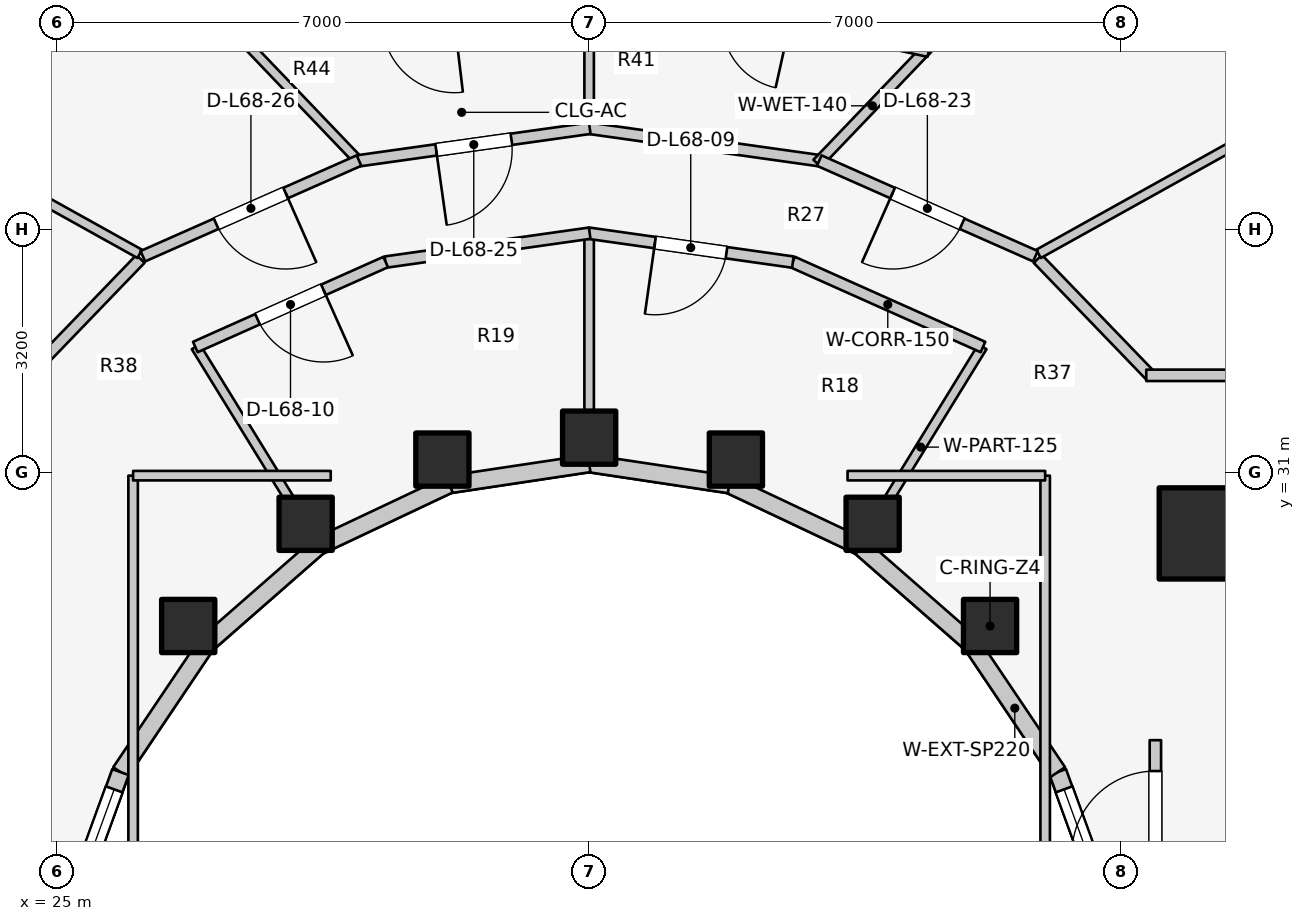
"""IFC4 building model, lengths in metres.
Left out: names, types, materials, properties, quantities, classifications, styles, units other than length and angle.
Written with IfcOpenShell. Run it as: python <this file> out.ifc"""

import sys

from ifc_helpers import new_model, si_unit, direction, frame, frame_2d, origin, origin_2d, place, context, subcontext, project, spatial, rectangle, extrude, element, fill, save


model = new_model("IFC4")
c1 = context("Model", 3, precision=1e-05, world=origin(), true_north=direction((0.0, 1.0)))
c2 = subcontext(c1, "Body", "Model", "MODEL_VIEW")
j1 = project(units=[si_unit("LENGTHUNIT", "METRE"), si_unit("PLANEANGLEUNIT", "RADIAN")], contexts=[c1])
p1 = place(None, origin())
s1 = spatial("IfcSite", under=j1, at=p1, CompositionType="ELEMENT")
p2 = place(p1, origin())
s2 = spatial("IfcBuilding", under=s1, at=p2, CompositionType="ELEMENT")
p3 = place(p2, frame((0.0, 0.0, 223.3)))
s3 = spatial("IfcBuildingStorey", under=s2, at=p3, CompositionType="ELEMENT", Elevation=223.3)
p4 = place(p3, frame((39.85, 30.35, 0.0), z_axis=(0.0, 0.0, 1.0), x_axis=(1.0, 0.0, 0.0)))
e1 = element("IfcWall", 1, at=p4, inside=s3, PredefinedType="SHEAR", context=c2, shape_type="SweptSolid", body=[
    extrude(rectangle(XDim=4.5, YDim=0.55, at=frame_2d((2.25, 0.0))), origin(), (0.0, 0.0, 1.0), 3.1),
])
p5 = place(p3, frame((40.1, 30.2, 0.0), z_axis=(0.0, 0.0, 1.0), x_axis=(1.0, 0.0, 0.0)))
e2 = element("IfcColumn", 2, at=p5, inside=s3, PredefinedType="COLUMN", context=c2, shape_type="SweptSolid", body=[
    extrude(rectangle(XDim=1.2, YDim=1.2, at=origin_2d()), origin(), (0.0, 0.0, 1.0), 3.1),
])
for number, where, z_axis, x_axis in (
    (3, (37.275, 28.982, 0.0), (0.0, 0.0, 1.0), (1.0, 0.0, 0.0)),
    (4, (35.73, 30.327, 0.0), (0.0, 0.0, 1.0), (1.0, 0.0, 0.0)),
    (5, (33.931, 31.172, 0.0), (0.0, 0.0, 1.0), (1.0, 0.0, 0.0)),
    (6, (32.0, 31.46, 0.0), (0.0, 0.0, 1.0), (1.0, 0.0, 0.0)),
    (7, (30.069, 31.172, 0.0), (0.0, 0.0, 1.0), (1.0, 0.0, 0.0)),
    (8, (28.27, 30.327, 0.0), (0.0, 0.0, 1.0), (1.0, 0.0, 0.0)),
    (9, (26.725, 28.982, 0.0), (0.0, 0.0, 1.0), (1.0, 0.0, 0.0)),
):
    element("IfcColumn", number, at=place(p3, frame(where, z_axis=z_axis, x_axis=x_axis)), inside=s3, PredefinedType="COLUMN", context=c2, shape_type="SweptSolid", body=[
        extrude(rectangle(XDim=0.7, YDim=0.7, at=origin_2d()), origin(), (0.0, 0.0, 1.0), 3.1),
    ])
p6 = place(p3, frame((38.877, 25.102, 0.0), z_axis=(0.0, 0.0, 1.0), x_axis=(-0.341423187295, 0.93990968033, 0.0)))
e10 = element("IfcWall", 10, at=p6, inside=s3, PredefinedType="STANDARD", context=c2, shape_type="SweptSolid", body=[
    extrude(rectangle(XDim=2.084, YDim=0.23, at=frame_2d((1.042, 0.0))), origin(), (0.0, 0.0, 1.0), 2.84),
])
p7 = place(p6, frame((0.242, 0.0, 0.85)))
e11 = element("IfcOpeningElement", 11, at=p7, cuts=e10, PredefinedType="OPENING", context=c2, shape_type="SweptSolid", body=[
    extrude(rectangle(XDim=1.6, YDim=1.65, at=frame_2d((0.8, 0.825))), frame((0.0, 0.125, 0.0), z_axis=(0.0, -1.0, 0.0), x_axis=(1.0, 0.0, 0.0)), (0.0, 0.0, 1.0), 0.25),
])
p8 = place(p3, frame((38.166, 27.06, 0.0), z_axis=(0.0, 0.0, 1.0), x_axis=(-0.558197800898, 0.829707909492, 0.0)))
e12 = element("IfcWall", 12, at=p8, inside=s3, PredefinedType="STANDARD", context=c2, shape_type="SweptSolid", body=[
    extrude(rectangle(XDim=2.027, YDim=0.23, at=frame_2d((1.013, 0.0))), origin(), (0.0, 0.0, 1.0), 2.16),
])
p9 = place(p3, frame((37.035, 28.742, 0.0), z_axis=(0.0, 0.0, 1.0), x_axis=(-0.752576694707, 0.658504607869, 0.0)))
e13 = element("IfcWall", 13, at=p9, inside=s3, PredefinedType="STANDARD", context=c2, shape_type="SweptSolid", body=[
    extrude(rectangle(XDim=1.959, YDim=0.23, at=frame_2d((0.98, 0.0))), origin(), (0.0, 0.0, 1.0), 2.16),
])
p10 = place(p3, frame((35.56, 30.032, 0.0), z_axis=(0.0, 0.0, 1.0), x_axis=(-0.904179699603, 0.427152280606, 0.0)))
e14 = element("IfcWall", 14, at=p10, inside=s3, PredefinedType="STANDARD", context=c2, shape_type="SweptSolid", body=[
    extrude(rectangle(XDim=1.899, YDim=0.23, at=frame_2d((0.95, 0.0))), origin(), (0.0, 0.0, 1.0), 2.16),
])
for number, where, z_axis, x_axis in (
    (15, (33.843, 30.843, 0.0), (0.0, 0.0, 1.0), (-0.989, 0.149, 0.0)),
    (16, (32.0, 31.12, 0.0), (0.0, 0.0, 1.0), (-0.989, -0.149, 0.0)),
):
    element("IfcWall", number, at=place(p3, frame(where, z_axis=z_axis, x_axis=x_axis)), inside=s3, PredefinedType="STANDARD", context=c2, shape_type="SweptSolid", body=[
        extrude(rectangle(XDim=1.864, YDim=0.23, at=frame_2d((0.932, 0.0))), origin(), (0.0, 0.0, 1.0), 2.16),
    ])
p11 = place(p3, frame((30.157, 30.843, 0.0), z_axis=(0.0, 0.0, 1.0), x_axis=(-0.904179699603, -0.427152280606, 0.0)))
e17 = element("IfcWall", 17, at=p11, inside=s3, PredefinedType="STANDARD", context=c2, shape_type="SweptSolid", body=[
    extrude(rectangle(XDim=1.899, YDim=0.23, at=frame_2d((0.95, 0.0))), origin(), (0.0, 0.0, 1.0), 2.16),
])
p12 = place(p3, frame((28.44, 30.032, 0.0), z_axis=(0.0, 0.0, 1.0), x_axis=(-0.752576694707, -0.658504607869, 0.0)))
e18 = element("IfcWall", 18, at=p12, inside=s3, PredefinedType="STANDARD", context=c2, shape_type="SweptSolid", body=[
    extrude(rectangle(XDim=1.959, YDim=0.23, at=frame_2d((0.98, 0.0))), origin(), (0.0, 0.0, 1.0), 2.16),
])
p13 = place(p3, frame((26.965, 28.742, 0.0), z_axis=(0.0, 0.0, 1.0), x_axis=(-0.558197800898, -0.829707909492, 0.0)))
e19 = element("IfcWall", 19, at=p13, inside=s3, PredefinedType="STANDARD", context=c2, shape_type="SweptSolid", body=[
    extrude(rectangle(XDim=2.027, YDim=0.23, at=frame_2d((1.013, 0.0))), origin(), (0.0, 0.0, 1.0), 2.16),
])
p14 = place(p3, frame((25.834, 27.06, 0.0), z_axis=(0.0, 0.0, 1.0), x_axis=(-0.341423187295, -0.93990968033, 0.0)))
e20 = element("IfcWall", 20, at=p14, inside=s3, PredefinedType="STANDARD", context=c2, shape_type="SweptSolid", body=[
    extrude(rectangle(XDim=2.084, YDim=0.23, at=frame_2d((1.042, 0.0))), origin(), (0.0, 0.0, 1.0), 2.84),
])
p15 = place(p14, frame((0.242, 0.0, 0.85)))
e21 = element("IfcOpeningElement", 21, at=p15, cuts=e20, PredefinedType="OPENING", context=c2, shape_type="SweptSolid", body=[
    extrude(rectangle(XDim=1.6, YDim=1.65, at=frame_2d((0.8, 0.825))), frame((0.0, 0.125, 0.0), z_axis=(0.0, -1.0, 0.0), x_axis=(1.0, 0.0, 0.0)), (0.0, 0.0, 1.0), 0.25),
])
p16 = place(p3, frame((39.45, 24.08, 0.0), z_axis=(0.0, 0.0, 1.0), x_axis=(0.0, 1.0, 0.0)))
e22 = element("IfcWall", 22, at=p16, inside=s3, PredefinedType="PARTITIONING", context=c2, shape_type="SweptSolid", body=[
    extrude(rectangle(XDim=3.4, YDim=0.15, at=frame_2d((1.7, 0.0))), origin(), (0.0, 0.0, 1.0), 2.855),
])
p17 = place(p16, frame((1.894, 0.0, 0.0)))
e23 = element("IfcOpeningElement", 23, at=p17, cuts=e22, PredefinedType="OPENING", context=c2, shape_type="SweptSolid", body=[
    extrude(rectangle(XDim=1.1, YDim=2.1, at=frame_2d((0.55, 1.05))), frame((0.0, 0.085, 0.0), z_axis=(0.0, -1.0, 0.0), x_axis=(1.0, 0.0, 0.0)), (0.0, 0.0, 1.0), 0.17),
])
p18 = place(p3, frame((35.55, 30.015, 0.0), z_axis=(0.0, 0.0, 1.0), x_axis=(0.523992004803, 0.851723182086, 0.0)))
e24 = element("IfcWall", 24, at=p18, inside=s3, PredefinedType="PARTITIONING", context=c2, shape_type="SweptSolid", body=[
    extrude(rectangle(XDim=3.101, YDim=0.125, at=frame_2d((1.551, 0.0))), origin(), (0.0, 0.0, 1.0), 2.376),
])
p19 = place(p3, frame((32.0, 31.1, 0.0), z_axis=(0.0, 0.0, 1.0), x_axis=(0.0, 1.0, 0.0)))
e25 = element("IfcWall", 25, at=p19, inside=s3, PredefinedType="PARTITIONING", context=c2, shape_type="SweptSolid", body=[
    extrude(rectangle(XDim=3.05, YDim=0.125, at=frame_2d((1.525, 0.0))), origin(), (0.0, 0.0, 1.0), 2.376),
])
p20 = place(p3, frame((28.45, 30.015, 0.0), z_axis=(0.0, 0.0, 1.0), x_axis=(-0.523992004803, 0.851723182086, 0.0)))
e26 = element("IfcWall", 26, at=p20, inside=s3, PredefinedType="PARTITIONING", context=c2, shape_type="SweptSolid", body=[
    extrude(rectangle(XDim=3.101, YDim=0.125, at=frame_2d((1.551, 0.0))), origin(), (0.0, 0.0, 1.0), 2.376),
])
p21 = place(p3, frame((37.181, 32.652, 0.0), z_axis=(0.0, 0.0, 1.0), x_axis=(-0.913120130558, 0.407690602257, 0.0)))
e27 = element("IfcWall", 27, at=p21, inside=s3, PredefinedType="PARTITIONING", context=c2, shape_type="SweptSolid", body=[
    extrude(rectangle(XDim=2.743, YDim=0.15, at=frame_2d((1.371, 0.0))), origin(), (0.0, 0.0, 1.0), 2.376),
])
p22 = place(p3, frame((34.68, 33.77, 0.0), z_axis=(0.0, 0.0, 1.0), x_axis=(-0.990132151456, 0.140136799779, 0.0)))
e28 = element("IfcWall", 28, at=p22, inside=s3, PredefinedType="PARTITIONING", context=c2, shape_type="SweptSolid", body=[
    extrude(rectangle(XDim=2.714, YDim=0.15, at=frame_2d((1.357, 0.0))), origin(), (0.0, 0.0, 1.0), 2.376),
])
p23 = place(p22, frame((0.882, 0.0, 0.0)))
e29 = element("IfcOpeningElement", 29, at=p23, cuts=e28, PredefinedType="OPENING", context=c2, shape_type="SweptSolid", body=[
    extrude(rectangle(XDim=0.95, YDim=2.1, at=frame_2d((0.475, 1.05))), frame((0.0, 0.085, 0.0), z_axis=(0.0, -1.0, 0.0), x_axis=(1.0, 0.0, 0.0)), (0.0, 0.0, 1.0), 0.17),
])
p24 = place(p3, frame((32.007, 34.15, 0.0), z_axis=(0.0, 0.0, 1.0), x_axis=(-0.990132151456, -0.140136799779, 0.0)))
e30 = element("IfcWall", 30, at=p24, inside=s3, PredefinedType="PARTITIONING", context=c2, shape_type="SweptSolid", body=[
    extrude(rectangle(XDim=2.714, YDim=0.15, at=frame_2d((1.357, 0.0))), origin(), (0.0, 0.0, 1.0), 2.376),
])
p25 = place(p3, frame((29.323, 33.771, 0.0), z_axis=(0.0, 0.0, 1.0), x_axis=(-0.913120130558, -0.407690602257, 0.0)))
e31 = element("IfcWall", 31, at=p25, inside=s3, PredefinedType="PARTITIONING", context=c2, shape_type="SweptSolid", body=[
    extrude(rectangle(XDim=2.743, YDim=0.15, at=frame_2d((1.371, 0.0))), origin(), (0.0, 0.0, 1.0), 2.376),
])
p26 = place(p25, frame((0.896, 0.0, 0.0)))
e32 = element("IfcOpeningElement", 32, at=p26, cuts=e31, PredefinedType="OPENING", context=c2, shape_type="SweptSolid", body=[
    extrude(rectangle(XDim=0.95, YDim=2.1, at=frame_2d((0.475, 1.05))), frame((0.0, 0.085, 0.0), z_axis=(0.0, -1.0, 0.0), x_axis=(1.0, 0.0, 0.0)), (0.0, 0.0, 1.0), 0.17),
])
p27 = place(p3, frame((26.0, 25.8, 0.0), z_axis=(0.0, 0.0, 1.0), x_axis=(0.0, 1.0, 0.0)))
e33 = element("IfcWall", 33, at=p27, inside=s3, PredefinedType="PARTITIONING", context=c2, shape_type="SweptSolid", body=[
    extrude(rectangle(XDim=5.16, YDim=0.125, at=frame_2d((2.58, 0.0))), origin(), (0.0, 0.0, 1.0), 2.232),
])
p28 = place(p3, frame((26.0, 30.96, 0.0), z_axis=(0.0, 0.0, 1.0), x_axis=(1.0, 0.0, 0.0)))
e34 = element("IfcWall", 34, at=p28, inside=s3, PredefinedType="PARTITIONING", context=c2, shape_type="SweptSolid", body=[
    extrude(rectangle(XDim=2.6, YDim=0.125, at=frame_2d((1.3, 0.0))), origin(), (0.0, 0.0, 1.0), 2.376),
])
p29 = place(p3, frame((38.0, 25.8, 0.0), z_axis=(0.0, 0.0, 1.0), x_axis=(0.0, 1.0, 0.0)))
e35 = element("IfcWall", 35, at=p29, inside=s3, PredefinedType="PARTITIONING", context=c2, shape_type="SweptSolid", body=[
    extrude(rectangle(XDim=5.16, YDim=0.125, at=frame_2d((2.58, 0.0))), origin(), (0.0, 0.0, 1.0), 2.232),
])
p30 = place(p3, frame((35.4, 30.96, 0.0), z_axis=(0.0, 0.0, 1.0), x_axis=(1.0, 0.0, 0.0)))
e36 = element("IfcWall", 36, at=p30, inside=s3, PredefinedType="PARTITIONING", context=c2, shape_type="SweptSolid", body=[
    extrude(rectangle(XDim=2.6, YDim=0.125, at=frame_2d((1.3, 0.0))), origin(), (0.0, 0.0, 1.0), 2.376),
])
p31 = place(p3, frame((37.903, 33.812, 0.0), z_axis=(0.0, 0.0, 1.0), x_axis=(0.694032962553, -0.719943224768, 0.0)))
e37 = element("IfcWall", 37, at=p31, inside=s3, PredefinedType="PARTITIONING", context=c2, shape_type="SweptSolid", body=[
    extrude(rectangle(XDim=2.158, YDim=0.15, at=frame_2d((1.079, 0.0))), origin(), (0.0, 0.0, 1.0), 2.376),
])
p32 = place(p3, frame((39.33, 32.28, 0.0), z_axis=(0.0, 0.0, 1.0), x_axis=(1.0, 0.0, 0.0)))
e38 = element("IfcWall", 38, at=p32, inside=s3, PredefinedType="PARTITIONING", context=c2, shape_type="SweptSolid", body=[
    extrude(rectangle(XDim=7.52, YDim=0.15, at=frame_2d((3.76, 0.0))), origin(), (0.0, 0.0, 1.0), 2.376),
])
p33 = place(p32, frame((5.22, 0.0, 0.0)))
e39 = element("IfcOpeningElement", 39, at=p33, cuts=e38, PredefinedType="OPENING", context=c2, shape_type="SweptSolid", body=[
    extrude(rectangle(XDim=0.9, YDim=2.1, at=frame_2d((0.45, 1.05))), frame((0.0, 0.085, 0.0), z_axis=(0.0, -1.0, 0.0), x_axis=(1.0, 0.0, 0.0)), (0.0, 0.0, 1.0), 0.17),
])
p34 = place(p3, frame((26.097, 33.812, 0.0), z_axis=(0.0, 0.0, 1.0), x_axis=(-0.694032962553, -0.719943224768, 0.0)))
e40 = element("IfcWall", 40, at=p34, inside=s3, PredefinedType="PARTITIONING", context=c2, shape_type="SweptSolid", body=[
    extrude(rectangle(XDim=2.158, YDim=0.15, at=frame_2d((1.079, 0.0))), origin(), (0.0, 0.0, 1.0), 2.376),
])
p35 = place(p3, frame((37.913, 33.878, 0.0), z_axis=(0.0, 0.0, 1.0), x_axis=(0.87377679808, 0.486327160599, 0.0)))
e41 = element("IfcWall", 41, at=p35, inside=s3, PredefinedType="PARTITIONING", context=c2, shape_type="SweptSolid", body=[
    extrude(rectangle(XDim=6.24, YDim=0.125, at=frame_2d((3.12, 0.0))), origin(), (0.0, 0.0, 1.0), 2.376),
])
p36 = place(p3, frame((32.0, 35.585, 0.0), z_axis=(0.0, 0.0, 1.0), x_axis=(0.0, 1.0, 0.0)))
e42 = element("IfcWall", 42, at=p36, inside=s3, PredefinedType="PARTITIONING", context=c2, shape_type="SweptSolid", body=[
    extrude(rectangle(XDim=4.115, YDim=0.125, at=frame_2d((2.058, 0.0))), origin(), (0.0, 0.0, 1.0), 2.376),
])
p37 = place(p3, frame((28.926, 35.143, 0.0), z_axis=(0.0, 0.0, 1.0), x_axis=(-0.691128003726, 0.722732372642, 0.0)))
e43 = element("IfcWall", 43, at=p37, inside=s3, PredefinedType="PARTITIONING", context=c2, shape_type="SweptSolid", body=[
    extrude(rectangle(XDim=5.33, YDim=0.125, at=frame_2d((2.665, 0.0))), origin(), (0.0, 0.0, 1.0), 2.376),
])
p38 = place(p3, frame((26.087, 33.878, 0.0), z_axis=(0.0, 0.0, 1.0), x_axis=(-0.87377679808, 0.486327160599, 0.0)))
e44 = element("IfcWall", 44, at=p38, inside=s3, PredefinedType="PARTITIONING", context=c2, shape_type="SweptSolid", body=[
    extrude(rectangle(XDim=6.24, YDim=0.125, at=frame_2d((3.12, 0.0))), origin(), (0.0, 0.0, 1.0), 2.376),
])
p39 = place(p3, frame((35.085, 35.096, 0.0), z_axis=(0.0, 0.0, 1.0), x_axis=(-0.990254086283, 0.139272555084, 0.0)))
e45 = element("IfcWall", 45, at=p39, inside=s3, PredefinedType="PARTITIONING", context=c2, shape_type="SweptSolid", body=[
    extrude(rectangle(XDim=3.166, YDim=0.15, at=frame_2d((1.583, 0.0))), origin(), (0.0, 0.0, 1.0), 2.376),
])
p40 = place(p3, frame((35.001, 35.067, 0.0), z_axis=(0.0, 0.0, 1.0), x_axis=(0.691180416361, 0.722682248321, 0.0)))
e46 = element("IfcWall", 46, at=p40, inside=s3, PredefinedType="PLUMBINGWALL", context=c2, shape_type="SweptSolid", body=[
    extrude(rectangle(XDim=2.1, YDim=0.14, at=frame_2d((1.05, 0.0))), origin(), (0.0, 0.0, 1.0), 2.385),
])
p41 = place(p3, frame((36.467, 36.538, 0.0), z_axis=(0.0, 0.0, 1.0), x_axis=(-0.976214372251, 0.21680751696, 0.0)))
e47 = element("IfcWall", 47, at=p41, inside=s3, PredefinedType="PLUMBINGWALL", context=c2, shape_type="SweptSolid", body=[
    extrude(rectangle(XDim=4.626, YDim=0.14, at=frame_2d((2.313, 0.0))), origin(), (0.0, 0.0, 1.0), 2.376),
])
p42 = place(p41, frame((1.863, 0.0, 0.0)))
e48 = element("IfcOpeningElement", 48, at=p42, cuts=e47, PredefinedType="OPENING", context=c2, shape_type="SweptSolid", body=[
    extrude(rectangle(XDim=0.9, YDim=2.1, at=frame_2d((0.45, 1.05))), frame((0.0, 0.08, 0.0), z_axis=(0.0, -1.0, 0.0), x_axis=(1.0, 0.0, 0.0)), (0.0, 0.0, 1.0), 0.16),
])
p43 = place(p3, frame((37.872, 33.847, 0.0), z_axis=(0.0, 0.0, 1.0), x_axis=(-0.914490094652, 0.40460828808, 0.0)))
e49 = element("IfcWall", 49, at=p43, inside=s3, PredefinedType="PARTITIONING", context=c2, shape_type="SweptSolid", body=[
    extrude(rectangle(XDim=3.11, YDim=0.15, at=frame_2d((1.555, 0.0))), origin(), (0.0, 0.0, 1.0), 2.376),
])
p44 = place(p43, frame((1.055, 0.0, 0.0)))
e50 = element("IfcOpeningElement", 50, at=p44, cuts=e49, PredefinedType="OPENING", context=c2, shape_type="SweptSolid", body=[
    extrude(rectangle(XDim=1.0, YDim=2.1, at=frame_2d((0.5, 1.05))), frame((0.0, 0.085, 0.0), z_axis=(0.0, -1.0, 0.0), x_axis=(1.0, 0.0, 0.0)), (0.0, 0.0, 1.0), 0.17),
])
p45 = place(p3, frame((32.008, 35.53, 0.0), z_axis=(0.0, 0.0, 1.0), x_axis=(-0.990257602807, -0.139247549651, 0.0)))
e51 = element("IfcWall", 51, at=p45, inside=s3, PredefinedType="PARTITIONING", context=c2, shape_type="SweptSolid", body=[
    extrude(rectangle(XDim=3.082, YDim=0.15, at=frame_2d((1.541, 0.0))), origin(), (0.0, 0.0, 1.0), 2.376),
])
p46 = place(p45, frame((1.041, 0.0, 0.0)))
e52 = element("IfcOpeningElement", 52, at=p46, cuts=e51, PredefinedType="OPENING", context=c2, shape_type="SweptSolid", body=[
    extrude(rectangle(XDim=1.0, YDim=2.1, at=frame_2d((0.5, 1.05))), frame((0.0, 0.085, 0.0), z_axis=(0.0, -1.0, 0.0), x_axis=(1.0, 0.0, 0.0)), (0.0, 0.0, 1.0), 0.17),
])
p47 = place(p3, frame((28.972, 35.105, 0.0), z_axis=(0.0, 0.0, 1.0), x_axis=(-0.914490094652, -0.40460828808, 0.0)))
e53 = element("IfcWall", 53, at=p47, inside=s3, PredefinedType="PARTITIONING", context=c2, shape_type="SweptSolid", body=[
    extrude(rectangle(XDim=3.11, YDim=0.15, at=frame_2d((1.555, 0.0))), origin(), (0.0, 0.0, 1.0), 2.376),
])
p48 = place(p47, frame((1.055, 0.0, 0.0)))
e54 = element("IfcOpeningElement", 54, at=p48, cuts=e53, PredefinedType="OPENING", context=c2, shape_type="SweptSolid", body=[
    extrude(rectangle(XDim=1.0, YDim=2.1, at=frame_2d((0.5, 1.05))), frame((0.0, 0.085, 0.0), z_axis=(0.0, -1.0, 0.0), x_axis=(1.0, 0.0, 0.0)), (0.0, 0.0, 1.0), 0.17),
])
p49 = place(p7, origin())
e55 = element("IfcWindow", 55, at=p49, inside=s3, PartitioningType="SINGLE_PANEL", PredefinedType="WINDOW", context=c2, shape_type="SweptSolid", body=[
    extrude(rectangle(XDim=1.6, YDim=1.65, at=frame_2d((0.8, 0.825))), frame((0.0, 0.03, 0.0), z_axis=(0.0, -1.0, 0.0), x_axis=(1.0, 0.0, 0.0)), (0.0, 0.0, 1.0), 0.06),
])
fill(e11, e55)
p50 = place(p15, origin())
e56 = element("IfcWindow", 56, at=p50, inside=s3, PartitioningType="SINGLE_PANEL", PredefinedType="WINDOW", context=c2, shape_type="SweptSolid", body=[
    extrude(rectangle(XDim=1.6, YDim=1.65, at=frame_2d((0.8, 0.825))), frame((0.0, 0.03, 0.0), z_axis=(0.0, -1.0, 0.0), x_axis=(1.0, 0.0, 0.0)), (0.0, 0.0, 1.0), 0.06),
])
fill(e21, e56)
p51 = place(p17, origin())
e57 = element("IfcDoor", 57, at=p51, inside=s3, OperationType="SINGLE_SWING_LEFT", PredefinedType="DOOR", context=c2, shape_type="SweptSolid", body=[
    extrude(rectangle(XDim=1.1, YDim=2.1, at=frame_2d((0.55, 1.05))), frame((0.0, 0.025, 0.0), z_axis=(0.0, -1.0, 0.0), x_axis=(1.0, 0.0, 0.0)), (0.0, 0.0, 1.0), 0.05),
])
fill(e23, e57)
p52 = place(p23, origin())
e58 = element("IfcDoor", 58, at=p52, inside=s3, OperationType="SINGLE_SWING_RIGHT", PredefinedType="DOOR", context=c2, shape_type="SweptSolid", body=[
    extrude(rectangle(XDim=0.95, YDim=2.1, at=frame_2d((0.475, 1.05))), frame((0.0, 0.025, 0.0), z_axis=(0.0, -1.0, 0.0), x_axis=(1.0, 0.0, 0.0)), (0.0, 0.0, 1.0), 0.05),
])
fill(e29, e58)
p53 = place(p26, origin())
e59 = element("IfcDoor", 59, at=p53, inside=s3, OperationType="SINGLE_SWING_LEFT", PredefinedType="DOOR", context=c2, shape_type="SweptSolid", body=[
    extrude(rectangle(XDim=0.95, YDim=2.1, at=frame_2d((0.475, 1.05))), frame((0.0, 0.025, 0.0), z_axis=(0.0, -1.0, 0.0), x_axis=(1.0, 0.0, 0.0)), (0.0, 0.0, 1.0), 0.05),
])
fill(e32, e59)
p54 = place(p44, origin())
e60 = element("IfcDoor", 60, at=p54, inside=s3, OperationType="SINGLE_SWING_RIGHT", PredefinedType="DOOR", context=c2, shape_type="SweptSolid", body=[
    extrude(rectangle(XDim=1.0, YDim=2.1, at=frame_2d((0.5, 1.05))), frame((0.0, 0.025, 0.0), z_axis=(0.0, -1.0, 0.0), x_axis=(1.0, 0.0, 0.0)), (0.0, 0.0, 1.0), 0.05),
])
fill(e50, e60)
p55 = place(p46, origin())
e61 = element("IfcDoor", 61, at=p55, inside=s3, OperationType="SINGLE_SWING_RIGHT", PredefinedType="DOOR", context=c2, shape_type="SweptSolid", body=[
    extrude(rectangle(XDim=1.0, YDim=2.1, at=frame_2d((0.5, 1.05))), frame((0.0, 0.025, 0.0), z_axis=(0.0, -1.0, 0.0), x_axis=(1.0, 0.0, 0.0)), (0.0, 0.0, 1.0), 0.05),
])
fill(e52, e61)
p56 = place(p48, origin())
e62 = element("IfcDoor", 62, at=p56, inside=s3, OperationType="SINGLE_SWING_LEFT", PredefinedType="DOOR", context=c2, shape_type="SweptSolid", body=[
    extrude(rectangle(XDim=1.0, YDim=2.1, at=frame_2d((0.5, 1.05))), frame((0.0, 0.025, 0.0), z_axis=(0.0, -1.0, 0.0), x_axis=(1.0, 0.0, 0.0)), (0.0, 0.0, 1.0), 0.05),
])
fill(e54, e62)
save(model, sys.argv[1])
